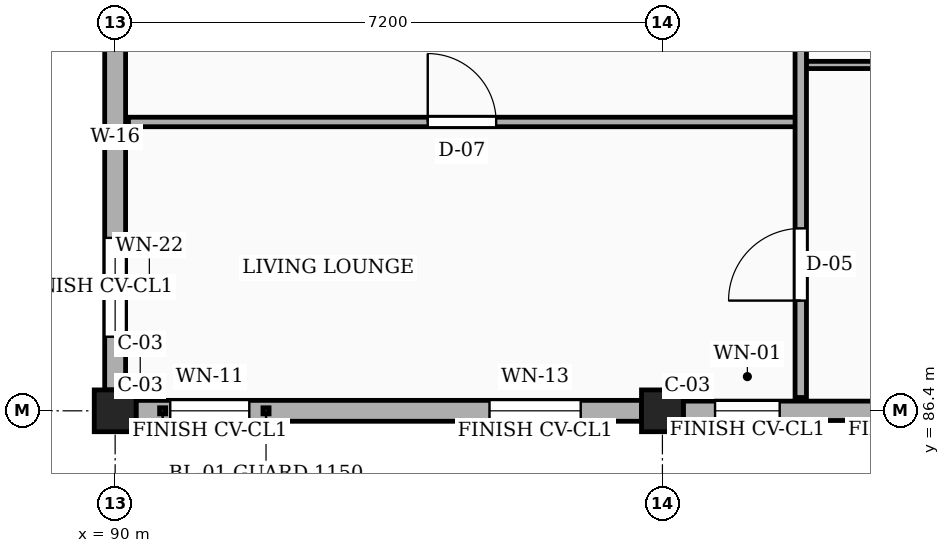
"""IFC4 building model, lengths in metres.
Left out: names, types, materials, properties, quantities, classifications, styles, units other than length and angle.
Written with IfcOpenShell. Run it as: python <this file> out.ifc"""

import sys

from ifc_helpers import new_model, si_unit, direction, frame, frame_2d, origin, origin_2d, place, context, subcontext, project, spatial, rectangle, extrude, element, fill, save


model = new_model("IFC4")
c1 = context("Model", 3, precision=1e-05, world=origin(), true_north=direction((0.0, 1.0)))
c2 = subcontext(c1, "Body", "Model", "MODEL_VIEW")
j1 = project(units=[si_unit("LENGTHUNIT", "METRE"), si_unit("PLANEANGLEUNIT", "RADIAN")], contexts=[c1])
p1 = place(None, origin())
s1 = spatial("IfcSite", under=j1, at=p1, CompositionType="ELEMENT")
p2 = place(p1, origin())
s2 = spatial("IfcBuilding", under=s1, at=p2, CompositionType="ELEMENT")
p3 = place(p2, frame((0.0, 0.0, 13.95)))
s3 = spatial("IfcBuildingStorey", under=s2, at=p3, CompositionType="ELEMENT", Elevation=13.95)
for number, where, z_axis, x_axis in (
    (1, (90.0, 86.4, 0.0), (0.0, 0.0, 1.0), (1.0, 0.0, 0.0)),
    (2, (97.2, 86.4, 0.0), (0.0, 0.0, 1.0), (1.0, 0.0, 0.0)),
):
    element("IfcColumn", number, at=place(p3, frame(where, z_axis=z_axis, x_axis=x_axis)), inside=s3, PredefinedType="COLUMN", context=c2, shape_type="SweptSolid", body=[
        extrude(rectangle(XDim=0.55, YDim=0.55, at=origin_2d()), origin(), (0.0, 0.0, 1.0), 3.15),
    ])
p4 = place(p3, frame((90.275, 86.4, 0.0), z_axis=(0.0, 0.0, 1.0), x_axis=(1.0, 0.0, 0.0)))
e3 = element("IfcWall", 3, at=p4, inside=s3, PredefinedType="SOLIDWALL", context=c2, shape_type="SweptSolid", body=[
    extrude(rectangle(XDim=6.65, YDim=0.275, at=frame_2d((3.325, 0.0))), origin(), (0.0, 0.0, 1.0), 2.46),
])
p5 = place(p4, frame((0.45, 0.0, 0.78)))
e4 = element("IfcOpeningElement", 4, at=p5, cuts=e3, PredefinedType="OPENING", context=c2, shape_type="SweptSolid", body=[
    extrude(rectangle(XDim=1.04, YDim=1.26, at=frame_2d((0.52, 0.63))), frame((0.0, 0.147, 0.0), z_axis=(0.0, -1.0, 0.0), x_axis=(1.0, 0.0, 0.0)), (0.0, 0.0, 1.0), 0.295),
])
p6 = place(p4, frame((4.65, 0.0, 0.78)))
e5 = element("IfcOpeningElement", 5, at=p6, cuts=e3, PredefinedType="OPENING", context=c2, shape_type="SweptSolid", body=[
    extrude(rectangle(XDim=1.2, YDim=1.26, at=frame_2d((0.6, 0.63))), frame((0.0, 0.147, 0.0), z_axis=(0.0, -1.0, 0.0), x_axis=(1.0, 0.0, 0.0)), (0.0, 0.0, 1.0), 0.295),
])
p7 = place(p3, frame((97.475, 86.4, 0.0), z_axis=(0.0, 0.0, 1.0), x_axis=(1.0, 0.0, 0.0)))
e6 = element("IfcWall", 6, at=p7, inside=s3, PredefinedType="SOLIDWALL", context=c2, shape_type="SweptSolid", body=[
    extrude(rectangle(XDim=6.65, YDim=0.255, at=frame_2d((3.325, 0.0))), origin(), (0.0, 0.0, 1.0), 2.46),
])
p8 = place(p7, frame((0.417, 0.0, 0.78)))
e7 = element("IfcOpeningElement", 7, at=p8, cuts=e6, PredefinedType="OPENING", context=c2, shape_type="SweptSolid", body=[
    extrude(rectangle(XDim=0.85, YDim=1.15, at=frame_2d((0.425, 0.575))), frame((0.0, 0.137, 0.0), z_axis=(0.0, -1.0, 0.0), x_axis=(1.0, 0.0, 0.0)), (0.0, 0.0, 1.0), 0.275),
])
p9 = place(p7, frame((2.505, 0.0, 0.78)))
e8 = element("IfcOpeningElement", 8, at=p9, cuts=e6, PredefinedType="OPENING", context=c2, shape_type="SweptSolid", body=[
    extrude(rectangle(XDim=1.36, YDim=1.26, at=frame_2d((0.68, 0.63))), frame((0.0, 0.137, 0.0), z_axis=(0.0, -1.0, 0.0), x_axis=(1.0, 0.0, 0.0)), (0.0, 0.0, 1.0), 0.275),
])
p10 = place(p7, frame((5.218, 0.0, 0.78)))
e9 = element("IfcOpeningElement", 9, at=p10, cuts=e6, PredefinedType="OPENING", context=c2, shape_type="SweptSolid", body=[
    extrude(rectangle(XDim=0.9, YDim=1.36, at=frame_2d((0.45, 0.68))), frame((0.0, 0.137, 0.0), z_axis=(0.0, -1.0, 0.0), x_axis=(1.0, 0.0, 0.0)), (0.0, 0.0, 1.0), 0.275),
])
p11 = place(p3, frame((90.0, 93.325, 0.0), z_axis=(0.0, 0.0, 1.0), x_axis=(0.0, -1.0, 0.0)))
e10 = element("IfcWall", 10, at=p11, inside=s3, PredefinedType="SOLIDWALL", context=c2, shape_type="SweptSolid", body=[
    extrude(rectangle(XDim=6.65, YDim=0.275, at=frame_2d((3.325, 0.0))), origin(), (0.0, 0.0, 1.0), 2.46),
])
p12 = place(p11, frame((0.45, 0.0, 0.78)))
e11 = element("IfcOpeningElement", 11, at=p12, cuts=e10, PredefinedType="OPENING", context=c2, shape_type="SweptSolid", body=[
    extrude(rectangle(XDim=1.14, YDim=1.36, at=frame_2d((0.57, 0.68))), frame((0.0, 0.147, 0.0), z_axis=(0.0, -1.0, 0.0), x_axis=(1.0, 0.0, 0.0)), (0.0, 0.0, 1.0), 0.295),
])
p13 = place(p11, frame((4.65, 0.0, 0.78)))
e12 = element("IfcOpeningElement", 12, at=p13, cuts=e10, PredefinedType="OPENING", context=c2, shape_type="SweptSolid", body=[
    extrude(rectangle(XDim=1.3, YDim=1.36, at=frame_2d((0.65, 0.68))), frame((0.0, 0.147, 0.0), z_axis=(0.0, -1.0, 0.0), x_axis=(1.0, 0.0, 0.0)), (0.0, 0.0, 1.0), 0.295),
])
p14 = place(p3, frame((90.175, 90.2, 0.0), z_axis=(0.0, 0.0, 1.0), x_axis=(1.0, 0.0, 0.0)))
e13 = element("IfcWall", 13, at=p14, inside=s3, PredefinedType="PARTITIONING", context=c2, shape_type="SweptSolid", body=[
    extrude(rectangle(XDim=8.775, YDim=0.125, at=frame_2d((4.387, 0.0))), origin(), (0.0, 0.0, 1.0), 2.325),
])
p15 = place(p14, frame((3.938, 0.0, 0.0)))
e14 = element("IfcOpeningElement", 14, at=p15, cuts=e13, PredefinedType="OPENING", context=c2, shape_type="SweptSolid", body=[
    extrude(rectangle(XDim=0.9, YDim=2.1, at=frame_2d((0.45, 1.05))), frame((0.0, 0.073, 0.0), z_axis=(0.0, -1.0, 0.0), x_axis=(1.0, 0.0, 0.0)), (0.0, 0.0, 1.0), 0.145),
])
p16 = place(p3, frame((99.09, 90.95, 0.0), z_axis=(0.0, 0.0, 1.0), x_axis=(1.0, 0.0, 0.0)))
e15 = element("IfcWall", 15, at=p16, inside=s3, PredefinedType="PARTITIONING", context=c2, shape_type="SweptSolid", body=[
    extrude(rectangle(XDim=3.12, YDim=0.095, at=frame_2d((1.56, 0.0))), origin(), (0.0, 0.0, 1.0), 2.325),
])
p17 = place(p16, frame((1.11, 0.0, 0.0)))
e16 = element("IfcOpeningElement", 16, at=p17, cuts=e15, PredefinedType="OPENING", context=c2, shape_type="SweptSolid", body=[
    extrude(rectangle(XDim=0.9, YDim=2.05, at=frame_2d((0.45, 1.025))), frame((0.0, 0.058, 0.0), z_axis=(0.0, -1.0, 0.0), x_axis=(1.0, 0.0, 0.0)), (0.0, 0.0, 1.0), 0.115),
])
p18 = place(p3, frame((99.02, 86.575, 0.0), z_axis=(0.0, 0.0, 1.0), x_axis=(0.0, 1.0, 0.0)))
e17 = element("IfcWall", 17, at=p18, inside=s3, PredefinedType="PARTITIONING", context=c2, shape_type="SweptSolid", body=[
    extrude(rectangle(XDim=6.885, YDim=0.15, at=frame_2d((3.442, 0.0))), origin(), (0.0, 0.0, 1.0), 2.325),
])
p19 = place(p18, frame((1.275, 0.0, 0.0)))
e18 = element("IfcOpeningElement", 18, at=p19, cuts=e17, PredefinedType="OPENING", context=c2, shape_type="SweptSolid", body=[
    extrude(rectangle(XDim=0.95, YDim=2.1, at=frame_2d((0.475, 1.05))), frame((0.0, 0.085, 0.0), z_axis=(0.0, -1.0, 0.0), x_axis=(1.0, 0.0, 0.0)), (0.0, 0.0, 1.0), 0.17),
])
p20 = place(p5, origin())
e19 = element("IfcWindow", 19, at=p20, inside=s3, PartitioningType="SINGLE_PANEL", PredefinedType="WINDOW", context=c2, shape_type="SweptSolid", body=[
    extrude(rectangle(XDim=1.04, YDim=1.26, at=frame_2d((0.52, 0.63))), frame((0.0, 0.03, 0.0), z_axis=(0.0, -1.0, 0.0), x_axis=(1.0, 0.0, 0.0)), (0.0, 0.0, 1.0), 0.06),
])
fill(e4, e19)
p21 = place(p6, origin())
e20 = element("IfcWindow", 20, at=p21, inside=s3, PartitioningType="SINGLE_PANEL", PredefinedType="WINDOW", context=c2, shape_type="SweptSolid", body=[
    extrude(rectangle(XDim=1.2, YDim=1.26, at=frame_2d((0.6, 0.63))), frame((0.0, 0.03, 0.0), z_axis=(0.0, -1.0, 0.0), x_axis=(1.0, 0.0, 0.0)), (0.0, 0.0, 1.0), 0.06),
])
fill(e5, e20)
p22 = place(p8, origin())
e21 = element("IfcWindow", 21, at=p22, inside=s3, PartitioningType="SINGLE_PANEL", PredefinedType="WINDOW", context=c2, shape_type="SweptSolid", body=[
    extrude(rectangle(XDim=0.85, YDim=1.15, at=frame_2d((0.425, 0.575))), frame((0.0, 0.03, 0.0), z_axis=(0.0, -1.0, 0.0), x_axis=(1.0, 0.0, 0.0)), (0.0, 0.0, 1.0), 0.06),
])
fill(e7, e21)
p23 = place(p13, origin())
e22 = element("IfcWindow", 22, at=p23, inside=s3, PartitioningType="SINGLE_PANEL", PredefinedType="WINDOW", context=c2, shape_type="SweptSolid", body=[
    extrude(rectangle(XDim=1.3, YDim=1.36, at=frame_2d((0.65, 0.68))), frame((0.0, 0.03, 0.0), z_axis=(0.0, -1.0, 0.0), x_axis=(1.0, 0.0, 0.0)), (0.0, 0.0, 1.0), 0.06),
])
fill(e12, e22)
p24 = place(p15, origin())
e23 = element("IfcDoor", 23, at=p24, inside=s3, OperationType="SINGLE_SWING_LEFT", PredefinedType="DOOR", context=c2, shape_type="SweptSolid", body=[
    extrude(rectangle(XDim=0.9, YDim=2.1, at=frame_2d((0.45, 1.05))), frame((0.0, 0.025, 0.0), z_axis=(0.0, -1.0, 0.0), x_axis=(1.0, 0.0, 0.0)), (0.0, 0.0, 1.0), 0.05),
])
fill(e14, e23)
p25 = place(p19, origin())
e24 = element("IfcDoor", 24, at=p25, inside=s3, OperationType="SINGLE_SWING_LEFT", PredefinedType="DOOR", context=c2, shape_type="SweptSolid", body=[
    extrude(rectangle(XDim=0.95, YDim=2.1, at=frame_2d((0.475, 1.05))), frame((0.0, 0.025, 0.0), z_axis=(0.0, -1.0, 0.0), x_axis=(1.0, 0.0, 0.0)), (0.0, 0.0, 1.0), 0.05),
])
fill(e18, e24)
save(model, sys.argv[1])
